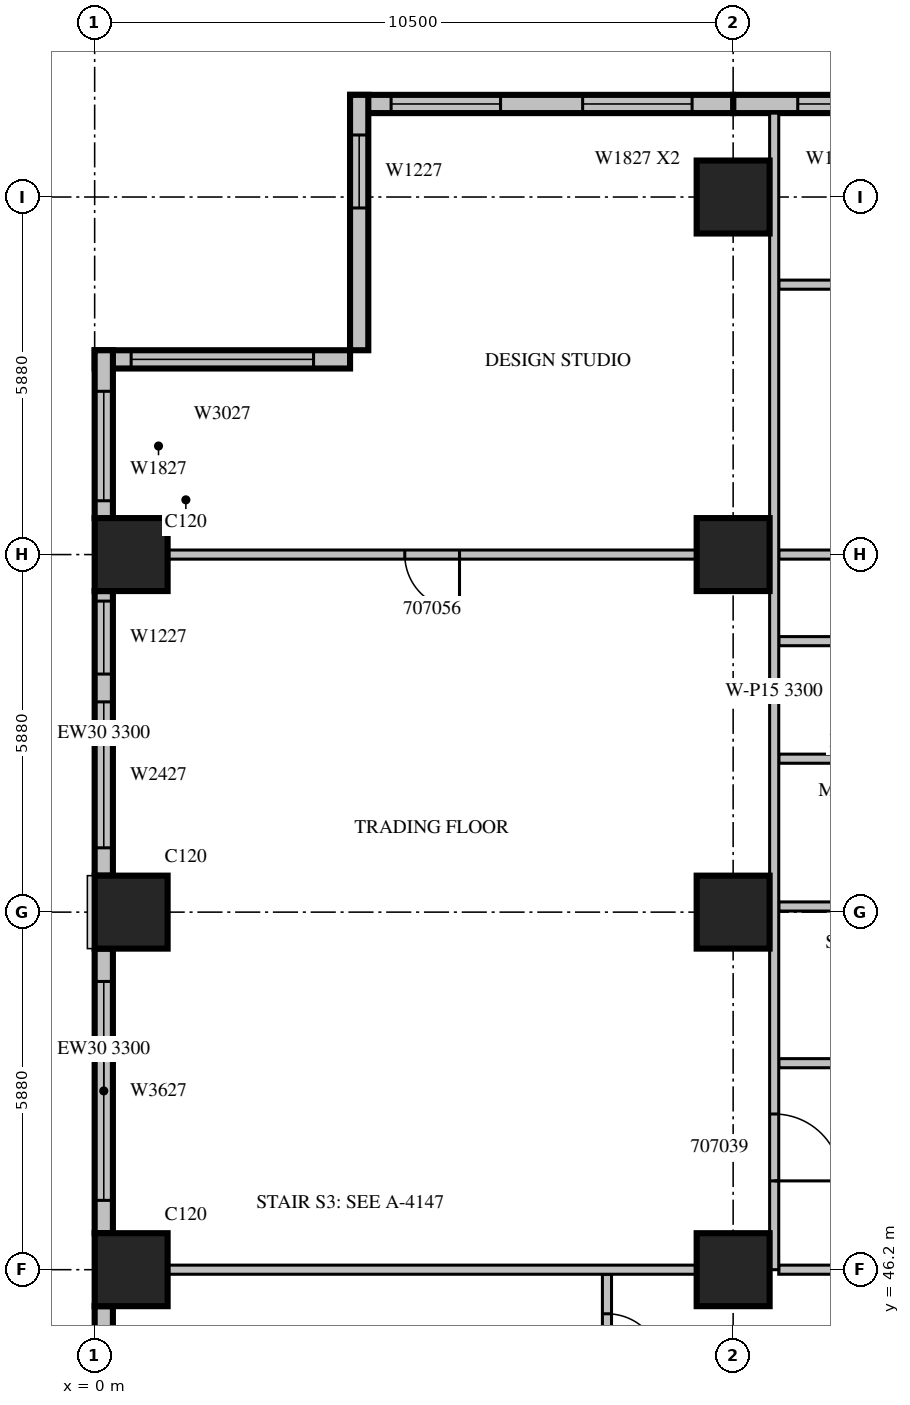
"""IFC4 building model, lengths in metres.
Left out: names, types, materials, properties, quantities, classifications, styles, units other than length and angle.
Written with IfcOpenShell. Run it as: python <this file> out.ifc"""

import sys

from ifc_helpers import new_model, si_unit, direction, frame, frame_2d, origin, origin_2d, place, context, subcontext, project, spatial, rectangle, extrude, source, transform, mapped, element, fill, save


model = new_model("IFC4")
c1 = context("Model", 3, precision=1e-05, world=origin(), true_north=direction((0.0, 1.0)))
c2 = subcontext(c1, "Body", "Model", "MODEL_VIEW")
j1 = project(units=[si_unit("LENGTHUNIT", "METRE"), si_unit("PLANEANGLEUNIT", "RADIAN")], contexts=[c1])
p1 = place(None, origin())
s1 = spatial("IfcSite", under=j1, at=p1, CompositionType="ELEMENT")
p2 = place(p1, origin())
s2 = spatial("IfcBuilding", under=s1, at=p2, CompositionType="ELEMENT")
p3 = place(p2, frame((0.0, 0.0, 40.5)))
s3 = spatial("IfcBuildingStorey", under=s2, at=p3, CompositionType="ELEMENT", Elevation=40.5)
m1 = source(origin(), c2, "Body", "SweptSolid", [
    extrude(rectangle(XDim=1.2, YDim=1.2, at=origin_2d()), origin(), (0.0, 0.0, 1.0), 4.2),
])
for number, where, z_axis, x_axis in (
    (1, (0.6, 46.2, 0.0), (0.0, 0.0, 1.0), (1.0, 0.0, 0.0)),
    (2, (10.5, 46.2, 0.0), (0.0, 0.0, 1.0), (1.0, 0.0, 0.0)),
    (3, (0.6, 52.08, 0.0), (0.0, 0.0, 1.0), (1.0, 0.0, 0.0)),
    (4, (10.5, 52.08, 0.0), (0.0, 0.0, 1.0), (1.0, 0.0, 0.0)),
    (5, (0.6, 57.96, 0.0), (0.0, 0.0, 1.0), (1.0, 0.0, 0.0)),
    (6, (10.5, 57.96, 0.0), (0.0, 0.0, 1.0), (1.0, 0.0, 0.0)),
    (7, (10.5, 63.84, 0.0), (0.0, 0.0, 1.0), (1.0, 0.0, 0.0)),
):
    element("IfcColumn", number, at=place(p3, frame(where, z_axis=z_axis, x_axis=x_axis)), inside=s3, PredefinedType="COLUMN", context=c2, shape_type="MappedRepresentation", body=[
        mapped(m1, transform((0.0, 0.0, 0.0), scale=1.0)),
    ])
m2 = source(origin(), c2, "Body", "SweptSolid", [
    extrude(rectangle(XDim=3.15, YDim=0.3, at=frame_2d((1.575, 0.0))), origin(), (0.0, 0.0, 1.0), 3.8),
])
p4 = place(p3, frame((13.65, 65.37, 0.0), z_axis=(0.0, 0.0, 1.0), x_axis=(-1.0, 0.0, 0.0)))
e8 = element("IfcWall", 8, at=p4, inside=s3, PredefinedType="STANDARD", context=c2, shape_type="MappedRepresentation", body=[
    mapped(m2, transform((0.0, 0.0, 0.0), scale=1.0)),
])
m3 = source(origin(), c2, "Body", "SweptSolid", [
    extrude(rectangle(XDim=1.2, YDim=2.7, at=frame_2d((0.6, 1.35))), frame((0.0, 0.16, 0.0), z_axis=(0.0, -1.0, 0.0), x_axis=(1.0, 0.0, 0.0)), (0.0, 0.0, 1.0), 0.32),
])
p5 = place(p4, frame((0.887, 0.0, 0.6)))
e9 = element("IfcOpeningElement", 9, at=p5, cuts=e8, PredefinedType="OPENING", context=c2, shape_type="MappedRepresentation", body=[
    mapped(m3, transform((0.0, 0.0, 0.0), scale=1.0)),
])
m4 = source(origin(), c2, "Body", "SweptSolid", [
    extrude(rectangle(XDim=6.3, YDim=0.3, at=frame_2d((3.15, 0.0))), origin(), (0.0, 0.0, 1.0), 3.8),
])
p6 = place(p3, frame((10.5, 65.37, 0.0), z_axis=(0.0, 0.0, 1.0), x_axis=(-1.0, 0.0, 0.0)))
e10 = element("IfcWall", 10, at=p6, inside=s3, PredefinedType="STANDARD", context=c2, shape_type="MappedRepresentation", body=[
    mapped(m4, transform((0.0, 0.0, 0.0), scale=1.0)),
])
m5 = source(origin(), c2, "Body", "SweptSolid", [
    extrude(rectangle(XDim=1.8, YDim=2.7, at=frame_2d((0.9, 1.35))), frame((0.0, 0.16, 0.0), z_axis=(0.0, -1.0, 0.0), x_axis=(1.0, 0.0, 0.0)), (0.0, 0.0, 1.0), 0.32),
])
p7 = place(p6, frame((0.675, 0.0, 0.6)))
e11 = element("IfcOpeningElement", 11, at=p7, cuts=e10, PredefinedType="OPENING", context=c2, shape_type="MappedRepresentation", body=[
    mapped(m5, transform((0.0, 0.0, 0.0), scale=1.0)),
])
p8 = place(p6, frame((3.825, 0.0, 0.6)))
e12 = element("IfcOpeningElement", 12, at=p8, cuts=e10, PredefinedType="OPENING", context=c2, shape_type="MappedRepresentation", body=[
    mapped(m5, transform((0.0, 0.0, 0.0), scale=1.0)),
])
m6 = source(origin(), c2, "Body", "SweptSolid", [
    extrude(rectangle(XDim=4.2, YDim=0.3, at=frame_2d((2.1, 0.0))), origin(), (0.0, 0.0, 1.0), 3.8),
])
p9 = place(p3, frame((4.35, 65.52, 0.0), z_axis=(0.0, 0.0, 1.0), x_axis=(0.0, -1.0, 0.0)))
e13 = element("IfcWall", 13, at=p9, inside=s3, PredefinedType="STANDARD", context=c2, shape_type="MappedRepresentation", body=[
    mapped(m6, transform((0.0, 0.0, 0.0), scale=1.0)),
])
p10 = place(p9, frame((0.66, 0.0, 0.6)))
e14 = element("IfcOpeningElement", 14, at=p10, cuts=e13, PredefinedType="OPENING", context=c2, shape_type="MappedRepresentation", body=[
    mapped(m3, transform((0.0, 0.0, 0.0), scale=1.0)),
])
p11 = place(p3, frame((4.2, 61.17, 0.0), z_axis=(0.0, 0.0, 1.0), x_axis=(-1.0, 0.0, 0.0)))
e15 = element("IfcWall", 15, at=p11, inside=s3, PredefinedType="STANDARD", context=c2, shape_type="MappedRepresentation", body=[
    mapped(m6, transform((0.0, 0.0, 0.0), scale=1.0)),
])
m7 = source(origin(), c2, "Body", "SweptSolid", [
    extrude(rectangle(XDim=3.0, YDim=2.7, at=frame_2d((1.5, 1.35))), frame((0.0, 0.16, 0.0), z_axis=(0.0, -1.0, 0.0), x_axis=(1.0, 0.0, 0.0)), (0.0, 0.0, 1.0), 0.32),
])
p12 = place(p11, frame((0.6, 0.0, 0.6)))
e16 = element("IfcOpeningElement", 16, at=p12, cuts=e15, PredefinedType="OPENING", context=c2, shape_type="MappedRepresentation", body=[
    mapped(m7, transform((0.0, 0.0, 0.0), scale=1.0)),
])
m8 = source(origin(), c2, "Body", "SweptSolid", [
    extrude(rectangle(XDim=2.76, YDim=0.3, at=frame_2d((1.38, 0.0))), origin(), (0.0, 0.0, 1.0), 3.8),
])
p13 = place(p3, frame((0.15, 61.32, 0.0), z_axis=(0.0, 0.0, 1.0), x_axis=(0.0, -1.0, 0.0)))
e17 = element("IfcWall", 17, at=p13, inside=s3, PredefinedType="STANDARD", context=c2, shape_type="MappedRepresentation", body=[
    mapped(m8, transform((0.0, 0.0, 0.0), scale=1.0)),
])
p14 = place(p13, frame((0.675, 0.0, 0.6)))
e18 = element("IfcOpeningElement", 18, at=p14, cuts=e17, PredefinedType="OPENING", context=c2, shape_type="MappedRepresentation", body=[
    mapped(m5, transform((0.0, 0.0, 0.0), scale=1.0)),
])
m9 = source(origin(), c2, "Body", "SweptSolid", [
    extrude(rectangle(XDim=4.68, YDim=0.3, at=frame_2d((2.34, 0.0))), origin(), (0.0, 0.0, 1.0), 3.3),
])
p15 = place(p3, frame((0.15, 57.36, 0.0), z_axis=(0.0, 0.0, 1.0), x_axis=(0.0, -1.0, 0.0)))
e19 = element("IfcWall", 19, at=p15, inside=s3, PredefinedType="STANDARD", context=c2, shape_type="MappedRepresentation", body=[
    mapped(m9, transform((0.0, 0.0, 0.0), scale=1.0)),
])
p16 = place(p15, frame((0.165, 0.0, 0.6)))
e20 = element("IfcOpeningElement", 20, at=p16, cuts=e19, PredefinedType="OPENING", context=c2, shape_type="MappedRepresentation", body=[
    mapped(m3, transform((0.0, 0.0, 0.0), scale=1.0)),
])
m10 = source(origin(), c2, "Body", "SweptSolid", [
    extrude(rectangle(XDim=2.4, YDim=2.7, at=frame_2d((1.2, 1.35))), frame((0.0, 0.16, 0.0), z_axis=(0.0, -1.0, 0.0), x_axis=(1.0, 0.0, 0.0)), (0.0, 0.0, 1.0), 0.32),
])
p17 = place(p15, frame((1.823, 0.0, 0.6)))
e21 = element("IfcOpeningElement", 21, at=p17, cuts=e19, PredefinedType="OPENING", context=c2, shape_type="MappedRepresentation", body=[
    mapped(m10, transform((0.0, 0.0, 0.0), scale=1.0)),
])
p18 = place(p3, frame((0.15, 51.48, 0.0), z_axis=(0.0, 0.0, 1.0), x_axis=(0.0, -1.0, 0.0)))
e22 = element("IfcWall", 22, at=p18, inside=s3, PredefinedType="STANDARD", context=c2, shape_type="MappedRepresentation", body=[
    mapped(m9, transform((0.0, 0.0, 0.0), scale=1.0)),
])
m11 = source(origin(), c2, "Body", "SweptSolid", [
    extrude(rectangle(XDim=3.6, YDim=2.7, at=frame_2d((1.8, 1.35))), frame((0.0, 0.16, 0.0), z_axis=(0.0, -1.0, 0.0), x_axis=(1.0, 0.0, 0.0)), (0.0, 0.0, 1.0), 0.32),
])
p19 = place(p18, frame((0.54, 0.0, 0.6)))
e23 = element("IfcOpeningElement", 23, at=p19, cuts=e22, PredefinedType="OPENING", context=c2, shape_type="MappedRepresentation", body=[
    mapped(m11, transform((0.0, 0.0, 0.0), scale=1.0)),
])
m12 = source(origin(), c2, "Body", "SweptSolid", [
    extrude(rectangle(XDim=1.6, YDim=0.3, at=frame_2d((0.8, 0.0))), origin(), (0.0, 0.0, 1.0), 3.8),
])
p20 = place(p3, frame((0.15, 45.6, 0.0), z_axis=(0.0, 0.0, 1.0), x_axis=(0.0, -1.0, 0.0)))
e24 = element("IfcWall", 24, at=p20, inside=s3, PredefinedType="STANDARD", context=c2, shape_type="MappedRepresentation", body=[
    mapped(m12, transform((0.0, 0.0, 0.0), scale=1.0)),
])
m13 = source(origin(), c2, "Body", "SweptSolid", [
    extrude(rectangle(XDim=0.9, YDim=2.7, at=frame_2d((0.45, 1.35))), frame((0.0, 0.16, 0.0), z_axis=(0.0, -1.0, 0.0), x_axis=(1.0, 0.0, 0.0)), (0.0, 0.0, 1.0), 0.32),
])
p21 = place(p20, frame((0.35, 0.0, 0.6)))
e25 = element("IfcOpeningElement", 25, at=p21, cuts=e24, PredefinedType="OPENING", context=c2, shape_type="MappedRepresentation", body=[
    mapped(m13, transform((0.0, 0.0, 0.0), scale=1.0)),
])
m14 = source(origin(), c2, "Body", "SweptSolid", [
    extrude(rectangle(XDim=2.2, YDim=0.15, at=frame_2d((1.1, 0.0))), origin(), (0.0, 0.0, 1.0), 3.8),
])
p22 = place(p3, frame((8.425, 43.925, 0.0), z_axis=(0.0, 0.0, 1.0), x_axis=(0.0, 1.0, 0.0)))
e26 = element("IfcWall", 26, at=p22, inside=s3, PredefinedType="PARTITIONING", context=c2, shape_type="MappedRepresentation", body=[
    mapped(m14, transform((0.0, 0.0, 0.0), scale=1.0)),
])
m15 = source(origin(), c2, "Body", "SweptSolid", [
    extrude(rectangle(XDim=0.9, YDim=2.1, at=frame_2d((0.45, 1.05))), frame((0.0, 0.085, 0.0), z_axis=(0.0, -1.0, 0.0), x_axis=(1.0, 0.0, 0.0)), (0.0, 0.0, 1.0), 0.17),
])
p23 = place(p22, frame((0.65, 0.0, 0.0)))
e27 = element("IfcOpeningElement", 27, at=p23, cuts=e26, PredefinedType="OPENING", context=c2, shape_type="MappedRepresentation", body=[
    mapped(m15, transform((0.0, 0.0, 0.0), scale=1.0)),
])
m16 = source(origin(), c2, "Body", "SweptSolid", [
    extrude(rectangle(XDim=3.75, YDim=0.15, at=frame_2d((1.875, 0.0))), origin(), (0.0, 0.0, 1.0), 3.8),
])
for number, where, z_axis, x_axis in (
    (28, (15.0, 49.596, 0.0), (0.0, 0.0, 1.0), (-1.0, 0.0, 0.0)),
    (29, (15.0, 52.173, 0.0), (0.0, 0.0, 1.0), (-1.0, 0.0, 0.0)),
    (30, (15.0, 54.603, 0.0), (0.0, 0.0, 1.0), (-1.0, 0.0, 0.0)),
    (31, (15.0, 56.536, 0.0), (0.0, 0.0, 1.0), (-1.0, 0.0, 0.0)),
    (32, (15.0, 62.399, 0.0), (0.0, 0.0, 1.0), (-1.0, 0.0, 0.0)),
):
    element("IfcWall", number, at=place(p3, frame(where, z_axis=z_axis, x_axis=x_axis)), inside=s3, PredefinedType="PARTITIONING", context=c2, shape_type="MappedRepresentation", body=[
        mapped(m16, transform((0.0, 0.0, 0.0), scale=1.0)),
    ])
m17 = source(origin(), c2, "Body", "SweptSolid", [
    extrude(rectangle(XDim=8.702, YDim=0.15, at=frame_2d((4.351, 0.0))), origin(), (0.0, 0.0, 1.0), 3.8),
])
p24 = place(p3, frame((9.901, 46.2, 0.0), z_axis=(0.0, 0.0, 1.0), x_axis=(-1.0, 0.0, 0.0)))
e33 = element("IfcWall", 33, at=p24, inside=s3, PredefinedType="PARTITIONING", context=c2, shape_type="MappedRepresentation", body=[
    mapped(m17, transform((0.0, 0.0, 0.0), scale=1.0)),
])
p25 = place(p3, frame((15.0, 46.2, 0.0), z_axis=(0.0, 0.0, 1.0), x_axis=(-1.0, 0.0, 0.0)))
e34 = element("IfcWall", 34, at=p25, inside=s3, PredefinedType="PARTITIONING", context=c2, shape_type="MappedRepresentation", body=[
    mapped(m16, transform((0.0, 0.0, 0.0), scale=1.0)),
])
p26 = place(p3, frame((9.901, 57.96, 0.0), z_axis=(0.0, 0.0, 1.0), x_axis=(-1.0, 0.0, 0.0)))
e35 = element("IfcWall", 35, at=p26, inside=s3, PredefinedType="PARTITIONING", context=c2, shape_type="MappedRepresentation", body=[
    mapped(m17, transform((0.0, 0.0, 0.0), scale=1.0)),
])
p27 = place(p26, frame((3.901, 0.0, 0.0)))
e36 = element("IfcOpeningElement", 36, at=p27, cuts=e35, PredefinedType="OPENING", context=c2, shape_type="MappedRepresentation", body=[
    mapped(m15, transform((0.0, 0.0, 0.0), scale=1.0)),
])
p28 = place(p3, frame((15.0, 57.96, 0.0), z_axis=(0.0, 0.0, 1.0), x_axis=(-1.0, 0.0, 0.0)))
e37 = element("IfcWall", 37, at=p28, inside=s3, PredefinedType="PARTITIONING", context=c2, shape_type="MappedRepresentation", body=[
    mapped(m16, transform((0.0, 0.0, 0.0), scale=1.0)),
])
p29 = place(p3, frame((11.175, 46.2, 0.0), z_axis=(0.0, 0.0, 1.0), x_axis=(0.0, 1.0, 0.0)))
e38 = element("IfcWall", 38, at=p29, inside=s3, PredefinedType="PARTITIONING", context=c2, shape_type="SweptSolid", body=[
    extrude(rectangle(XDim=19.02, YDim=0.15, at=frame_2d((9.51, 0.0))), origin(), (0.0, 0.0, 1.0), 3.3),
])
m18 = source(origin(), c2, "Body", "SweptSolid", [
    extrude(rectangle(XDim=1.1, YDim=2.1, at=frame_2d((0.55, 1.05))), frame((0.0, 0.085, 0.0), z_axis=(0.0, -1.0, 0.0), x_axis=(1.0, 0.0, 0.0)), (0.0, 0.0, 1.0), 0.17),
])
p30 = place(p29, frame((1.46, 0.0, 0.0)))
e39 = element("IfcOpeningElement", 39, at=p30, cuts=e38, PredefinedType="OPENING", context=c2, shape_type="MappedRepresentation", body=[
    mapped(m18, transform((0.0, 0.0, 0.0), scale=1.0)),
])
m19 = source(origin(), c2, "Body", "SweptSolid", [
    extrude(rectangle(XDim=1.2, YDim=2.7, at=frame_2d((0.6, 1.35))), frame((0.0, 0.03, 0.0), z_axis=(0.0, -1.0, 0.0), x_axis=(1.0, 0.0, 0.0)), (0.0, 0.0, 1.0), 0.06),
])
p31 = place(p5, origin())
e40 = element("IfcWindow", 40, at=p31, inside=s3, PartitioningType="SINGLE_PANEL", PredefinedType="WINDOW", context=c2, shape_type="MappedRepresentation", body=[
    mapped(m19, transform((0.0, 0.0, 0.0), scale=1.0)),
])
fill(e9, e40)
m20 = source(origin(), c2, "Body", "SweptSolid", [
    extrude(rectangle(XDim=1.8, YDim=2.7, at=frame_2d((0.9, 1.35))), frame((0.0, 0.03, 0.0), z_axis=(0.0, -1.0, 0.0), x_axis=(1.0, 0.0, 0.0)), (0.0, 0.0, 1.0), 0.06),
])
p32 = place(p7, origin())
e41 = element("IfcWindow", 41, at=p32, inside=s3, PartitioningType="SINGLE_PANEL", PredefinedType="WINDOW", context=c2, shape_type="MappedRepresentation", body=[
    mapped(m20, transform((0.0, 0.0, 0.0), scale=1.0)),
])
fill(e11, e41)
p33 = place(p8, origin())
e42 = element("IfcWindow", 42, at=p33, inside=s3, PartitioningType="SINGLE_PANEL", PredefinedType="WINDOW", context=c2, shape_type="MappedRepresentation", body=[
    mapped(m20, transform((0.0, 0.0, 0.0), scale=1.0)),
])
fill(e12, e42)
p34 = place(p10, origin())
e43 = element("IfcWindow", 43, at=p34, inside=s3, PartitioningType="SINGLE_PANEL", PredefinedType="WINDOW", context=c2, shape_type="MappedRepresentation", body=[
    mapped(m19, transform((0.0, 0.0, 0.0), scale=1.0)),
])
fill(e14, e43)
m21 = source(origin(), c2, "Body", "SweptSolid", [
    extrude(rectangle(XDim=3.0, YDim=2.7, at=frame_2d((1.5, 1.35))), frame((0.0, 0.03, 0.0), z_axis=(0.0, -1.0, 0.0), x_axis=(1.0, 0.0, 0.0)), (0.0, 0.0, 1.0), 0.06),
])
p35 = place(p12, origin())
e44 = element("IfcWindow", 44, at=p35, inside=s3, PartitioningType="SINGLE_PANEL", PredefinedType="WINDOW", context=c2, shape_type="MappedRepresentation", body=[
    mapped(m21, transform((0.0, 0.0, 0.0), scale=1.0)),
])
fill(e16, e44)
p36 = place(p14, origin())
e45 = element("IfcWindow", 45, at=p36, inside=s3, PartitioningType="SINGLE_PANEL", PredefinedType="WINDOW", context=c2, shape_type="MappedRepresentation", body=[
    mapped(m20, transform((0.0, 0.0, 0.0), scale=1.0)),
])
fill(e18, e45)
p37 = place(p16, origin())
e46 = element("IfcWindow", 46, at=p37, inside=s3, PartitioningType="SINGLE_PANEL", PredefinedType="WINDOW", context=c2, shape_type="MappedRepresentation", body=[
    mapped(m19, transform((0.0, 0.0, 0.0), scale=1.0)),
])
fill(e20, e46)
m22 = source(origin(), c2, "Body", "SweptSolid", [
    extrude(rectangle(XDim=2.4, YDim=2.7, at=frame_2d((1.2, 1.35))), frame((0.0, 0.03, 0.0), z_axis=(0.0, -1.0, 0.0), x_axis=(1.0, 0.0, 0.0)), (0.0, 0.0, 1.0), 0.06),
])
p38 = place(p17, origin())
e47 = element("IfcWindow", 47, at=p38, inside=s3, PartitioningType="SINGLE_PANEL", PredefinedType="WINDOW", context=c2, shape_type="MappedRepresentation", body=[
    mapped(m22, transform((0.0, 0.0, 0.0), scale=1.0)),
])
fill(e21, e47)
m23 = source(origin(), c2, "Body", "SweptSolid", [
    extrude(rectangle(XDim=3.6, YDim=2.7, at=frame_2d((1.8, 1.35))), frame((0.0, 0.03, 0.0), z_axis=(0.0, -1.0, 0.0), x_axis=(1.0, 0.0, 0.0)), (0.0, 0.0, 1.0), 0.06),
])
p39 = place(p19, origin())
e48 = element("IfcWindow", 48, at=p39, inside=s3, PartitioningType="SINGLE_PANEL", PredefinedType="WINDOW", context=c2, shape_type="MappedRepresentation", body=[
    mapped(m23, transform((0.0, 0.0, 0.0), scale=1.0)),
])
fill(e23, e48)
m24 = source(origin(), c2, "Body", "SweptSolid", [
    extrude(rectangle(XDim=0.9, YDim=2.1, at=frame_2d((0.45, 1.05))), frame((0.0, 0.025, 0.0), z_axis=(0.0, -1.0, 0.0), x_axis=(1.0, 0.0, 0.0)), (0.0, 0.0, 1.0), 0.05),
])
p40 = place(p23, origin())
e49 = element("IfcDoor", 49, at=p40, inside=s3, OperationType="SINGLE_SWING_RIGHT", PredefinedType="DOOR", context=c2, shape_type="MappedRepresentation", body=[
    mapped(m24, transform((0.0, 0.0, 0.0), scale=1.0)),
])
fill(e27, e49)
m25 = source(origin(), c2, "Body", "SweptSolid", [
    extrude(rectangle(XDim=1.1, YDim=2.1, at=frame_2d((0.55, 1.05))), frame((0.0, 0.025, 0.0), z_axis=(0.0, -1.0, 0.0), x_axis=(1.0, 0.0, 0.0)), (0.0, 0.0, 1.0), 0.05),
])
p41 = place(p30, origin())
e50 = element("IfcDoor", 50, at=p41, inside=s3, OperationType="SINGLE_SWING_RIGHT", PredefinedType="DOOR", context=c2, shape_type="MappedRepresentation", body=[
    mapped(m25, transform((0.0, 0.0, 0.0), scale=1.0)),
])
fill(e39, e50)
p42 = place(p27, origin())
e51 = element("IfcDoor", 51, at=p42, inside=s3, OperationType="SINGLE_SWING_LEFT", PredefinedType="DOOR", context=c2, shape_type="MappedRepresentation", body=[
    mapped(m24, transform((0.0, 0.0, 0.0), scale=1.0)),
])
fill(e36, e51)
save(model, sys.argv[1])
